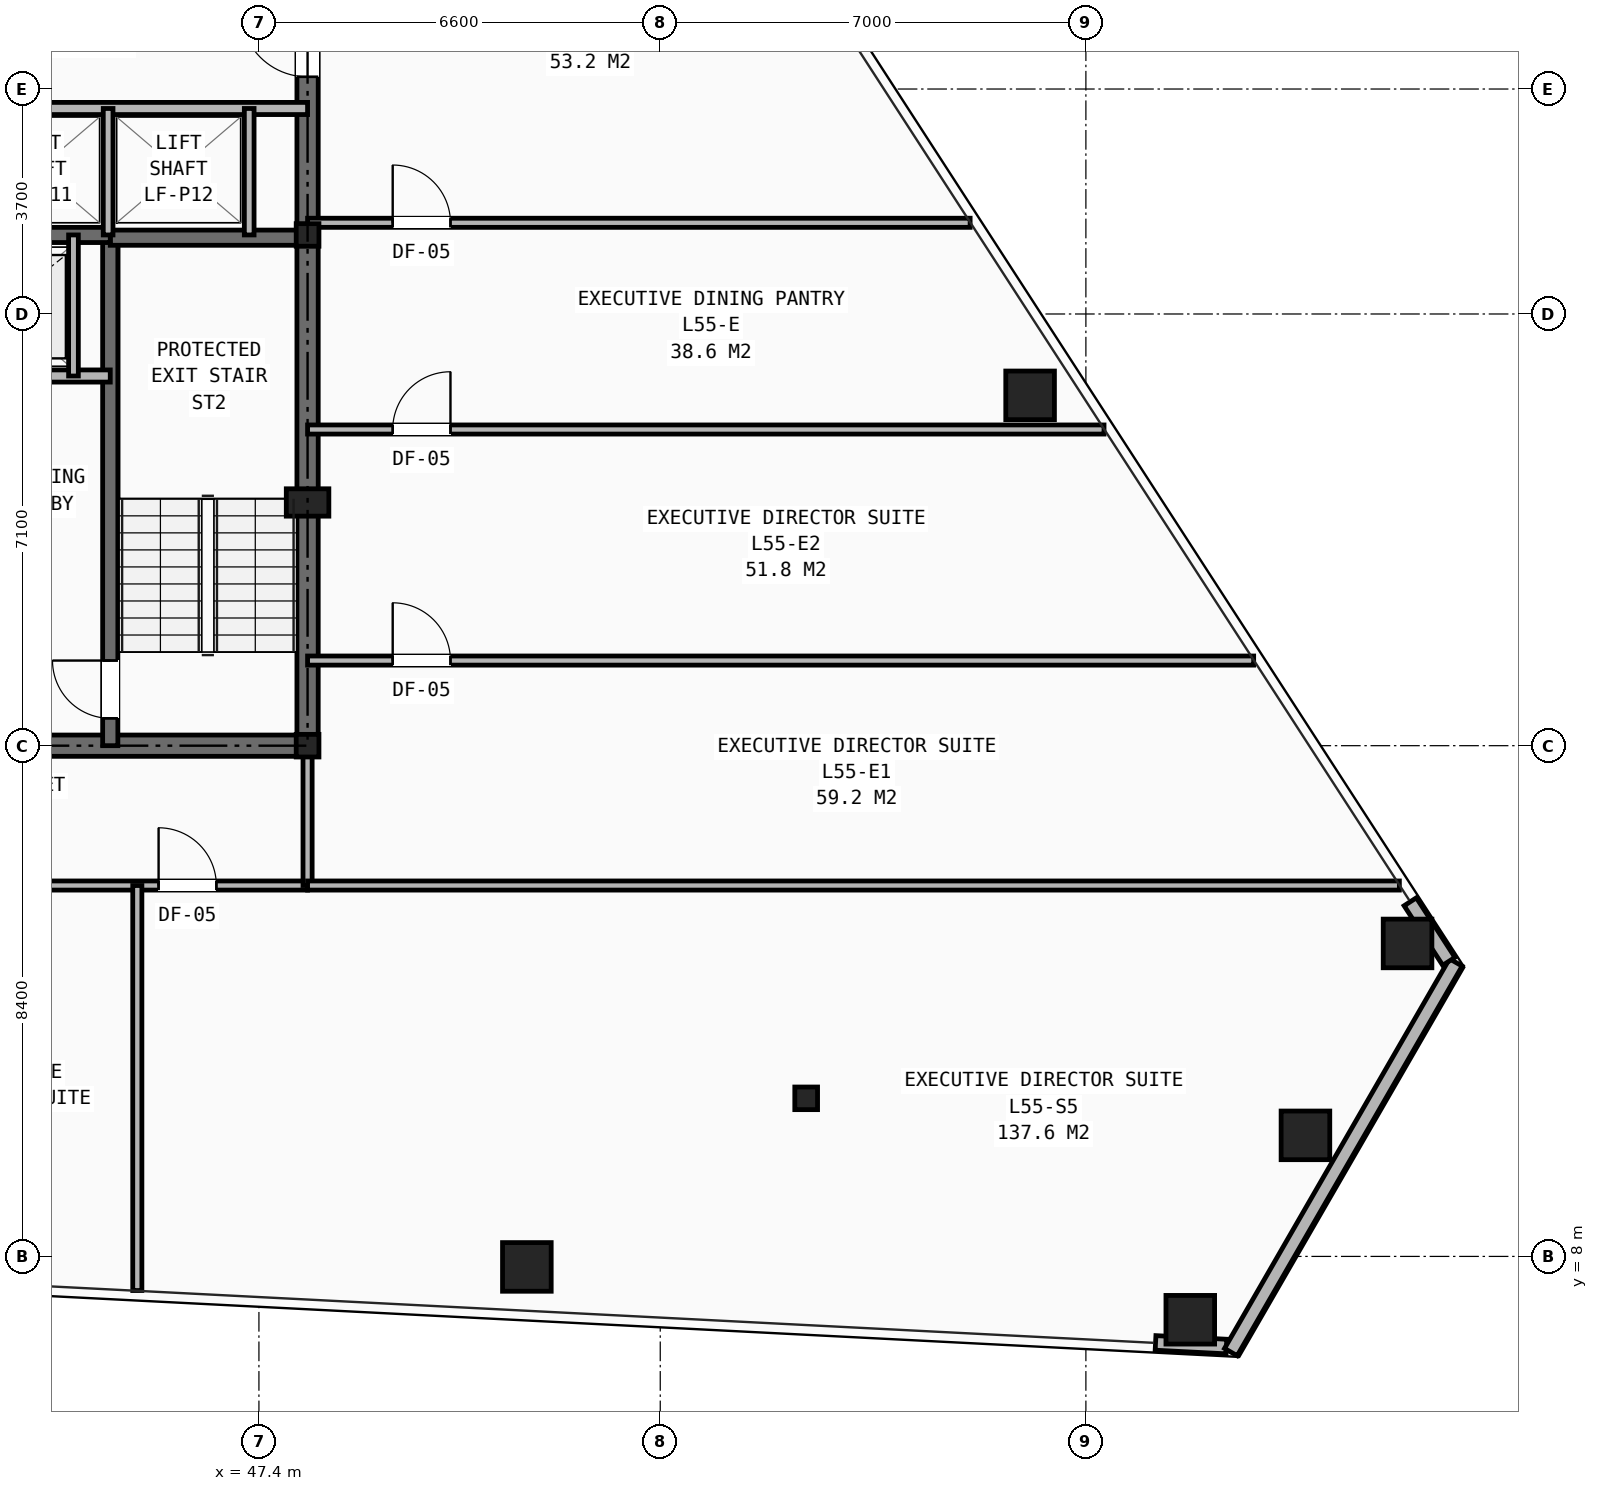
"""IFC4 building model, lengths in metres.
Left out: names, types, materials, properties, quantities, classifications, styles, units other than length and angle.
Written with IfcOpenShell. Run it as: python <this file> out.ifc"""

import sys

from ifc_helpers import new_model, si_unit, direction, frame, frame_2d, origin, origin_2d, place, context, subcontext, project, spatial, rectangle, hollow_rectangle, i_section, extrude, element, fill, save


model = new_model("IFC4")
c1 = context("Model", 3, precision=1e-05, world=origin(), true_north=direction((0.0, 1.0)))
c2 = subcontext(c1, "Body", "Model", "MODEL_VIEW")
j1 = project(units=[si_unit("LENGTHUNIT", "METRE"), si_unit("PLANEANGLEUNIT", "RADIAN")], contexts=[c1])
p1 = place(None, origin())
s1 = spatial("IfcSite", under=j1, at=p1, CompositionType="ELEMENT")
p2 = place(p1, origin())
s2 = spatial("IfcBuilding", under=s1, at=p2, CompositionType="ELEMENT")
p3 = place(p2, frame((0.0, 0.0, 193.05)))
s3 = spatial("IfcBuildingStorey", under=s2, at=p3, CompositionType="ELEMENT", Elevation=193.05)
for number, where, z_axis, x_axis in (
    (1, (48.2, 16.4, 0.0), (0.0, 0.0, 1.0), (1.0, 0.0, 0.0)),
    (2, (48.2, 24.8, 0.0), (0.0, 0.0, 1.0), (1.0, 0.0, 0.0)),
    (3, (56.4, 10.6, 0.0), (0.0, 0.0, 1.0), (1.0, 0.0, 0.0)),
):
    element("IfcColumn", number, at=place(p3, frame(where, z_axis=z_axis, x_axis=x_axis)), inside=s3, PredefinedType="COLUMN", context=c2, shape_type="SweptSolid", body=[
        extrude(i_section(OverallWidth=0.374, OverallDepth=0.372, WebThickness=0.016, FlangeThickness=0.026, at=origin_2d()), origin(), (0.0, 0.0, 1.0), 3.45),
    ])
p4 = place(p3, frame((48.2, 20.4, 0.0), z_axis=(0.0, 0.0, 1.0), x_axis=(1.0, 0.0, 0.0)))
e4 = element("IfcColumn", 4, at=p4, inside=s3, PredefinedType="PILASTER", context=c2, shape_type="SweptSolid", body=[
    extrude(rectangle(XDim=0.7, YDim=0.45, at=origin_2d()), origin(), (0.0, 0.0, 1.0), 3.45),
])
for number, where, z_axis, x_axis in (
    (5, (51.806, 7.827, 0.0), (0.0, 0.0, 1.0), (1.0, 0.0, 0.0)),
    (6, (62.717, 6.958, 0.0), (0.0, 0.0, 1.0), (1.0, 0.0, 0.0)),
    (7, (64.611, 9.991, 0.0), (0.0, 0.0, 1.0), (1.0, 0.0, 0.0)),
    (8, (66.29, 13.147, 0.0), (0.0, 0.0, 1.0), (1.0, 0.0, 0.0)),
    (9, (60.083, 22.162, 0.0), (0.0, 0.0, 1.0), (1.0, 0.0, 0.0)),
):
    element("IfcColumn", number, at=place(p3, frame(where, z_axis=z_axis, x_axis=x_axis)), inside=s3, PredefinedType="COLUMN", context=c2, shape_type="SweptSolid", body=[
        extrude(hollow_rectangle(XDim=0.8, YDim=0.8, WallThickness=0.055, at=origin_2d()), origin(), (0.0, 0.0, 1.0), 3.45),
    ])
p5 = place(p3, frame((62.146, 6.577, 0.0), z_axis=(0.0, 0.0, 1.0), x_axis=(0.998696973005, -0.051032892443, 0.0)))
e10 = element("IfcWall", 10, at=p5, inside=s3, PredefinedType="SHEAR", context=c2, shape_type="SweptSolid", body=[
    extrude(rectangle(XDim=1.167, YDim=0.24, at=frame_2d((0.583, 0.0))), origin(), (0.0, 0.0, 1.0), 2.403),
])
p6 = place(p3, frame((67.084, 12.835, 0.0), z_axis=(0.0, 0.0, 1.0), x_axis=(-0.499988999718, -0.866031754707, 0.0)))
e11 = element("IfcWall", 11, at=p6, inside=s3, PredefinedType="SHEAR", context=c2, shape_type="SweptSolid", body=[
    extrude(rectangle(XDim=7.4, YDim=0.24, at=frame_2d((3.7, 0.0))), origin(), (0.0, 0.0, 1.0), 2.403),
])
p7 = place(p3, frame((66.969, 12.853, 0.0), z_axis=(0.0, 0.0, 1.0), x_axis=(-0.543502707761, 0.839407413987, 0.0)))
e12 = element("IfcWall", 12, at=p7, inside=s3, PredefinedType="SHEAR", context=c2, shape_type="SweptSolid", body=[
    extrude(rectangle(XDim=1.167, YDim=0.24, at=frame_2d((0.584, 0.0))), origin(), (0.0, 0.0, 1.0), 2.403),
])
p8 = place(p3, frame((31.8, 16.4, 0.0), z_axis=(0.0, 0.0, 1.0), x_axis=(1.0, 0.0, 0.0)))
e13 = element("IfcWall", 13, at=p8, inside=s3, PredefinedType="SHEAR", context=c2, shape_type="SweptSolid", body=[
    extrude(rectangle(XDim=16.4, YDim=0.35, at=frame_2d((8.2, 0.0))), origin(), (0.0, 0.0, 1.0), 3.03),
])
p9 = place(p8, frame((7.75, 0.0, 0.0)))
e14 = element("IfcOpeningElement", 14, at=p9, cuts=e13, PredefinedType="OPENING", context=c2, shape_type="SweptSolid", body=[
    extrude(rectangle(XDim=0.9, YDim=2.1, at=frame_2d((0.45, 1.05))), frame((0.0, 0.185, 0.0), z_axis=(0.0, -1.0, 0.0), x_axis=(1.0, 0.0, 0.0)), (0.0, 0.0, 1.0), 0.37),
])
p10 = place(p8, frame((4.2, 0.0, 0.0)))
e15 = element("IfcOpeningElement", 15, at=p10, cuts=e13, PredefinedType="OPENING", context=c2, shape_type="SweptSolid", body=[
    extrude(rectangle(XDim=0.95, YDim=2.1, at=frame_2d((0.475, 1.05))), frame((0.0, 0.185, 0.0), z_axis=(0.0, -1.0, 0.0), x_axis=(1.0, 0.0, 0.0)), (0.0, 0.0, 1.0), 0.37),
])
p11 = place(p8, frame((10.6, 0.0, 0.0)))
e16 = element("IfcOpeningElement", 16, at=p11, cuts=e13, PredefinedType="OPENING", context=c2, shape_type="SweptSolid", body=[
    extrude(rectangle(XDim=0.95, YDim=2.1, at=frame_2d((0.475, 1.05))), frame((0.0, 0.185, 0.0), z_axis=(0.0, -1.0, 0.0), x_axis=(1.0, 0.0, 0.0)), (0.0, 0.0, 1.0), 0.37),
])
p12 = place(p3, frame((48.2, 16.4, 0.0), z_axis=(0.0, 0.0, 1.0), x_axis=(0.0, 1.0, 0.0)))
e17 = element("IfcWall", 17, at=p12, inside=s3, PredefinedType="SHEAR", context=c2, shape_type="SweptSolid", body=[
    extrude(rectangle(XDim=14.8, YDim=0.35, at=frame_2d((7.4, 0.0))), origin(), (0.0, 0.0, 1.0), 3.03),
])
p13 = place(p12, frame((11.0, 0.0, 0.0)))
e18 = element("IfcOpeningElement", 18, at=p13, cuts=e17, PredefinedType="OPENING", context=c2, shape_type="SweptSolid", body=[
    extrude(rectangle(XDim=1.1, YDim=2.15, at=frame_2d((0.55, 1.075))), frame((0.0, 0.185, 0.0), z_axis=(0.0, -1.0, 0.0), x_axis=(1.0, 0.0, 0.0)), (0.0, 0.0, 1.0), 0.37),
])
p14 = place(p3, frame((44.955, 16.4, 0.0), z_axis=(0.0, 0.0, 1.0), x_axis=(0.0, 1.0, 0.0)))
e19 = element("IfcWall", 19, at=p14, inside=s3, PredefinedType="SHEAR", context=c2, shape_type="SweptSolid", body=[
    extrude(rectangle(XDim=8.4, YDim=0.25, at=frame_2d((4.2, 0.0))), origin(), (0.0, 0.0, 1.0), 3.03),
])
p15 = place(p14, frame((0.45, 0.0, 0.0)))
e20 = element("IfcOpeningElement", 20, at=p15, cuts=e19, PredefinedType="OPENING", context=c2, shape_type="SweptSolid", body=[
    extrude(rectangle(XDim=0.95, YDim=2.1, at=frame_2d((0.475, 1.05))), frame((0.0, 0.135, 0.0), z_axis=(0.0, -1.0, 0.0), x_axis=(1.0, 0.0, 0.0)), (0.0, 0.0, 1.0), 0.27),
])
p16 = place(p3, frame((44.955, 24.755, 0.0), z_axis=(0.0, 0.0, 1.0), x_axis=(1.0, 0.0, 0.0)))
e21 = element("IfcWall", 21, at=p16, inside=s3, PredefinedType="SHEAR", context=c2, shape_type="SweptSolid", body=[
    extrude(rectangle(XDim=3.245, YDim=0.25, at=frame_2d((1.623, 0.0))), origin(), (0.0, 0.0, 1.0), 3.03),
])
p17 = place(p3, frame((35.045, 24.8, 0.0), z_axis=(0.0, 0.0, 1.0), x_axis=(1.0, 0.0, 0.0)))
e22 = element("IfcWall", 22, at=p17, inside=s3, PredefinedType="SHEAR", context=c2, shape_type="SweptSolid", body=[
    extrude(rectangle(XDim=9.91, YDim=0.25, at=frame_2d((4.955, 0.0))), origin(), (0.0, 0.0, 1.0), 3.03),
])
p18 = place(p3, frame((35.045, 22.48, 0.0), z_axis=(0.0, 0.0, 1.0), x_axis=(1.0, 0.0, 0.0)))
e23 = element("IfcWall", 23, at=p18, inside=s3, PredefinedType="SOLIDWALL", context=c2, shape_type="SweptSolid", body=[
    extrude(rectangle(XDim=9.91, YDim=0.2, at=frame_2d((4.955, 0.0))), origin(), (0.0, 0.0, 1.0), 3.03),
])
p19 = place(p18, frame((1.255, 0.0, 0.0)))
e24 = element("IfcOpeningElement", 24, at=p19, cuts=e23, PredefinedType="OPENING", context=c2, shape_type="SweptSolid", body=[
    extrude(rectangle(XDim=1.1, YDim=2.15, at=frame_2d((0.55, 1.075))), frame((0.0, 0.11, 0.0), z_axis=(0.0, -1.0, 0.0), x_axis=(1.0, 0.0, 0.0)), (0.0, 0.0, 1.0), 0.22),
])
p20 = place(p18, frame((7.555, 0.0, 0.0)))
e25 = element("IfcOpeningElement", 25, at=p20, cuts=e23, PredefinedType="OPENING", context=c2, shape_type="SweptSolid", body=[
    extrude(rectangle(XDim=1.1, YDim=2.15, at=frame_2d((0.55, 1.075))), frame((0.0, 0.11, 0.0), z_axis=(0.0, -1.0, 0.0), x_axis=(1.0, 0.0, 0.0)), (0.0, 0.0, 1.0), 0.22),
])
p21 = place(p18, frame((4.405, 0.0, 0.0)))
e26 = element("IfcOpeningElement", 26, at=p21, cuts=e23, PredefinedType="OPENING", context=c2, shape_type="SweptSolid", body=[
    extrude(rectangle(XDim=1.1, YDim=2.15, at=frame_2d((0.55, 1.075))), frame((0.0, 0.11, 0.0), z_axis=(0.0, -1.0, 0.0), x_axis=(1.0, 0.0, 0.0)), (0.0, 0.0, 1.0), 0.22),
])
p22 = place(p3, frame((44.35, 22.48, 0.0), z_axis=(0.0, 0.0, 1.0), x_axis=(0.0, 1.0, 0.0)))
e27 = element("IfcWall", 27, at=p22, inside=s3, PredefinedType="SOLIDWALL", context=c2, shape_type="SweptSolid", body=[
    extrude(rectangle(XDim=2.32, YDim=0.16, at=frame_2d((1.16, 0.0))), origin(), (0.0, 0.0, 1.0), 3.03),
])
p23 = place(p3, frame((31.8, 26.88, 0.0), z_axis=(0.0, 0.0, 1.0), x_axis=(1.0, 0.0, 0.0)))
e28 = element("IfcWall", 28, at=p23, inside=s3, PredefinedType="SOLIDWALL", context=c2, shape_type="SweptSolid", body=[
    extrude(rectangle(XDim=16.4, YDim=0.2, at=frame_2d((8.2, 0.0))), origin(), (0.0, 0.0, 1.0), 2.485),
])
p24 = place(p23, frame((0.55, 0.0, 0.0)))
e29 = element("IfcOpeningElement", 29, at=p24, cuts=e28, PredefinedType="OPENING", context=c2, shape_type="SweptSolid", body=[
    extrude(rectangle(XDim=0.85, YDim=2.05, at=frame_2d((0.425, 1.025))), frame((0.0, 0.11, 0.0), z_axis=(0.0, -1.0, 0.0), x_axis=(1.0, 0.0, 0.0)), (0.0, 0.0, 1.0), 0.22),
])
p25 = place(p23, frame((2.55, 0.0, 0.0)))
e30 = element("IfcOpeningElement", 30, at=p25, cuts=e28, PredefinedType="OPENING", context=c2, shape_type="SweptSolid", body=[
    extrude(rectangle(XDim=1.1, YDim=2.15, at=frame_2d((0.55, 1.075))), frame((0.0, 0.11, 0.0), z_axis=(0.0, -1.0, 0.0), x_axis=(1.0, 0.0, 0.0)), (0.0, 0.0, 1.0), 0.22),
])
p26 = place(p23, frame((4.71, 0.0, 0.0)))
e31 = element("IfcOpeningElement", 31, at=p26, cuts=e28, PredefinedType="OPENING", context=c2, shape_type="SweptSolid", body=[
    extrude(rectangle(XDim=1.1, YDim=2.15, at=frame_2d((0.55, 1.075))), frame((0.0, 0.11, 0.0), z_axis=(0.0, -1.0, 0.0), x_axis=(1.0, 0.0, 0.0)), (0.0, 0.0, 1.0), 0.22),
])
p27 = place(p23, frame((6.87, 0.0, 0.0)))
e32 = element("IfcOpeningElement", 32, at=p27, cuts=e28, PredefinedType="OPENING", context=c2, shape_type="SweptSolid", body=[
    extrude(rectangle(XDim=1.1, YDim=2.15, at=frame_2d((0.55, 1.075))), frame((0.0, 0.11, 0.0), z_axis=(0.0, -1.0, 0.0), x_axis=(1.0, 0.0, 0.0)), (0.0, 0.0, 1.0), 0.22),
])
p28 = place(p23, frame((9.03, 0.0, 0.0)))
e33 = element("IfcOpeningElement", 33, at=p28, cuts=e28, PredefinedType="OPENING", context=c2, shape_type="SweptSolid", body=[
    extrude(rectangle(XDim=1.1, YDim=2.15, at=frame_2d((0.55, 1.075))), frame((0.0, 0.11, 0.0), z_axis=(0.0, -1.0, 0.0), x_axis=(1.0, 0.0, 0.0)), (0.0, 0.0, 1.0), 0.22),
])
for number, where, z_axis, x_axis in (
    (34, (44.92, 24.8, 0.0), (0.0, 0.0, 1.0), (0.0, 1.0, 0.0)),
    (35, (47.24, 24.8, 0.0), (0.0, 0.0, 1.0), (0.0, 1.0, 0.0)),
):
    element("IfcWall", number, at=place(p3, frame(where, z_axis=z_axis, x_axis=x_axis)), inside=s3, PredefinedType="SOLIDWALL", context=c2, shape_type="SweptSolid", body=[
        extrude(rectangle(XDim=2.08, YDim=0.16, at=frame_2d((1.04, 0.0))), origin(), (0.0, 0.0, 1.0), 3.03),
    ])
p29 = place(p3, frame((29.6, 14.1, 0.0), z_axis=(0.0, 0.0, 1.0), x_axis=(1.0, 0.0, 0.0)))
e36 = element("IfcWall", 36, at=p29, inside=s3, PredefinedType="PARTITIONING", context=c2, shape_type="SweptSolid", body=[
    extrude(rectangle(XDim=18.6, YDim=0.15, at=frame_2d((9.3, 0.0))), origin(), (0.0, 0.0, 1.0), 2.161),
])
p30 = place(p29, frame((0.55, 0.0, 0.0)))
e37 = element("IfcOpeningElement", 37, at=p30, cuts=e36, PredefinedType="OPENING", context=c2, shape_type="SweptSolid", body=[
    extrude(rectangle(XDim=0.95, YDim=2.1, at=frame_2d((0.475, 1.05))), frame((0.0, 0.085, 0.0), z_axis=(0.0, -1.0, 0.0), x_axis=(1.0, 0.0, 0.0)), (0.0, 0.0, 1.0), 0.17),
])
p31 = place(p29, frame((3.55, 0.0, 0.0)))
e38 = element("IfcOpeningElement", 38, at=p31, cuts=e36, PredefinedType="OPENING", context=c2, shape_type="SweptSolid", body=[
    extrude(rectangle(XDim=0.95, YDim=2.1, at=frame_2d((0.475, 1.05))), frame((0.0, 0.085, 0.0), z_axis=(0.0, -1.0, 0.0), x_axis=(1.0, 0.0, 0.0)), (0.0, 0.0, 1.0), 0.17),
])
p32 = place(p29, frame((7.55, 0.0, 0.0)))
e39 = element("IfcOpeningElement", 39, at=p32, cuts=e36, PredefinedType="OPENING", context=c2, shape_type="SweptSolid", body=[
    extrude(rectangle(XDim=0.95, YDim=2.1, at=frame_2d((0.475, 1.05))), frame((0.0, 0.085, 0.0), z_axis=(0.0, -1.0, 0.0), x_axis=(1.0, 0.0, 0.0)), (0.0, 0.0, 1.0), 0.17),
])
p33 = place(p29, frame((11.95, 0.0, 0.0)))
e40 = element("IfcOpeningElement", 40, at=p33, cuts=e36, PredefinedType="OPENING", context=c2, shape_type="SweptSolid", body=[
    extrude(rectangle(XDim=0.95, YDim=2.1, at=frame_2d((0.475, 1.05))), frame((0.0, 0.085, 0.0), z_axis=(0.0, -1.0, 0.0), x_axis=(1.0, 0.0, 0.0)), (0.0, 0.0, 1.0), 0.17),
])
p34 = place(p29, frame((16.15, 0.0, 0.0)))
e41 = element("IfcOpeningElement", 41, at=p34, cuts=e36, PredefinedType="OPENING", context=c2, shape_type="SweptSolid", body=[
    extrude(rectangle(XDim=0.95, YDim=2.1, at=frame_2d((0.475, 1.05))), frame((0.0, 0.085, 0.0), z_axis=(0.0, -1.0, 0.0), x_axis=(1.0, 0.0, 0.0)), (0.0, 0.0, 1.0), 0.17),
])
p35 = place(p3, frame((48.2, 14.1, 0.0), z_axis=(0.0, 0.0, 1.0), x_axis=(0.0, 1.0, 0.0)))
e42 = element("IfcWall", 42, at=p35, inside=s3, PredefinedType="PARTITIONING", context=c2, shape_type="SweptSolid", body=[
    extrude(rectangle(XDim=2.3, YDim=0.15, at=frame_2d((1.15, 0.0))), origin(), (0.0, 0.0, 1.0), 2.485),
])
p36 = place(p3, frame((45.4, 7.439, 0.0), z_axis=(0.0, 0.0, 1.0), x_axis=(0.0, 1.0, 0.0)))
e43 = element("IfcWall", 43, at=p36, inside=s3, PredefinedType="PARTITIONING", context=c2, shape_type="SweptSolid", body=[
    extrude(rectangle(XDim=6.661, YDim=0.15, at=frame_2d((3.331, 0.0))), origin(), (0.0, 0.0, 1.0), 2.409),
])
p37 = place(p3, frame((48.2, 14.1, 0.0), z_axis=(0.0, 0.0, 1.0), x_axis=(1.0, 0.0, 0.0)))
e44 = element("IfcWall", 44, at=p37, inside=s3, PredefinedType="PARTITIONING", context=c2, shape_type="SweptSolid", body=[
    extrude(rectangle(XDim=17.956, YDim=0.15, at=frame_2d((8.978, 0.0))), origin(), (0.0, 0.0, 1.0), 2.161),
])
p38 = place(p3, frame((48.2, 17.8, 0.0), z_axis=(0.0, 0.0, 1.0), x_axis=(1.0, 0.0, 0.0)))
e45 = element("IfcWall", 45, at=p38, inside=s3, PredefinedType="PARTITIONING", context=c2, shape_type="SweptSolid", body=[
    extrude(rectangle(XDim=15.559, YDim=0.15, at=frame_2d((7.78, 0.0))), origin(), (0.0, 0.0, 1.0), 2.161),
])
p39 = place(p38, frame((1.4, 0.0, 0.0)))
e46 = element("IfcOpeningElement", 46, at=p39, cuts=e45, PredefinedType="OPENING", context=c2, shape_type="SweptSolid", body=[
    extrude(rectangle(XDim=0.95, YDim=2.1, at=frame_2d((0.475, 1.05))), frame((0.0, 0.085, 0.0), z_axis=(0.0, -1.0, 0.0), x_axis=(1.0, 0.0, 0.0)), (0.0, 0.0, 1.0), 0.17),
])
p40 = place(p3, frame((48.2, 21.6, 0.0), z_axis=(0.0, 0.0, 1.0), x_axis=(1.0, 0.0, 0.0)))
e47 = element("IfcWall", 47, at=p40, inside=s3, PredefinedType="PARTITIONING", context=c2, shape_type="SweptSolid", body=[
    extrude(rectangle(XDim=13.098, YDim=0.15, at=frame_2d((6.549, 0.0))), origin(), (0.0, 0.0, 1.0), 2.161),
])
p41 = place(p40, frame((1.4, 0.0, 0.0)))
e48 = element("IfcOpeningElement", 48, at=p41, cuts=e47, PredefinedType="OPENING", context=c2, shape_type="SweptSolid", body=[
    extrude(rectangle(XDim=0.95, YDim=2.1, at=frame_2d((0.475, 1.05))), frame((0.0, 0.085, 0.0), z_axis=(0.0, -1.0, 0.0), x_axis=(1.0, 0.0, 0.0)), (0.0, 0.0, 1.0), 0.17),
])
p42 = place(p3, frame((48.2, 25.0, 0.0), z_axis=(0.0, 0.0, 1.0), x_axis=(1.0, 0.0, 0.0)))
e49 = element("IfcWall", 49, at=p42, inside=s3, PredefinedType="PARTITIONING", context=c2, shape_type="SweptSolid", body=[
    extrude(rectangle(XDim=10.896, YDim=0.15, at=frame_2d((5.448, 0.0))), origin(), (0.0, 0.0, 1.0), 2.161),
])
p43 = place(p42, frame((1.4, 0.0, 0.0)))
e50 = element("IfcOpeningElement", 50, at=p43, cuts=e49, PredefinedType="OPENING", context=c2, shape_type="SweptSolid", body=[
    extrude(rectangle(XDim=0.95, YDim=2.1, at=frame_2d((0.475, 1.05))), frame((0.0, 0.085, 0.0), z_axis=(0.0, -1.0, 0.0), x_axis=(1.0, 0.0, 0.0)), (0.0, 0.0, 1.0), 0.17),
])
p44 = place(p15, origin())
e51 = element("IfcDoor", 51, at=p44, inside=s3, OperationType="SINGLE_SWING_RIGHT", PredefinedType="DOOR", context=c2, shape_type="SweptSolid", body=[
    extrude(rectangle(XDim=0.95, YDim=2.1, at=frame_2d((0.475, 1.05))), frame((0.0, 0.025, 0.0), z_axis=(0.0, -1.0, 0.0), x_axis=(1.0, 0.0, 0.0)), (0.0, 0.0, 1.0), 0.05),
])
fill(e20, e51)
p45 = place(p13, origin())
e52 = element("IfcDoor", 52, at=p45, inside=s3, OperationType="SINGLE_SWING_RIGHT", PredefinedType="DOOR", context=c2, shape_type="SweptSolid", body=[
    extrude(rectangle(XDim=1.1, YDim=2.15, at=frame_2d((0.55, 1.075))), frame((0.0, 0.025, 0.0), z_axis=(0.0, -1.0, 0.0), x_axis=(1.0, 0.0, 0.0)), (0.0, 0.0, 1.0), 0.05),
])
fill(e18, e52)
p46 = place(p34, origin())
e53 = element("IfcDoor", 53, at=p46, inside=s3, OperationType="SINGLE_SWING_LEFT", PredefinedType="DOOR", context=c2, shape_type="SweptSolid", body=[
    extrude(rectangle(XDim=0.95, YDim=2.1, at=frame_2d((0.475, 1.05))), frame((0.0, 0.025, 0.0), z_axis=(0.0, -1.0, 0.0), x_axis=(1.0, 0.0, 0.0)), (0.0, 0.0, 1.0), 0.05),
])
fill(e41, e53)
p47 = place(p39, origin())
e54 = element("IfcDoor", 54, at=p47, inside=s3, OperationType="SINGLE_SWING_LEFT", PredefinedType="DOOR", context=c2, shape_type="SweptSolid", body=[
    extrude(rectangle(XDim=0.95, YDim=2.1, at=frame_2d((0.475, 1.05))), frame((0.0, 0.025, 0.0), z_axis=(0.0, -1.0, 0.0), x_axis=(1.0, 0.0, 0.0)), (0.0, 0.0, 1.0), 0.05),
])
fill(e46, e54)
p48 = place(p41, origin())
e55 = element("IfcDoor", 55, at=p48, inside=s3, OperationType="SINGLE_SWING_RIGHT", PredefinedType="DOOR", context=c2, shape_type="SweptSolid", body=[
    extrude(rectangle(XDim=0.95, YDim=2.1, at=frame_2d((0.475, 1.05))), frame((0.0, 0.025, 0.0), z_axis=(0.0, -1.0, 0.0), x_axis=(1.0, 0.0, 0.0)), (0.0, 0.0, 1.0), 0.05),
])
fill(e48, e55)
p49 = place(p43, origin())
e56 = element("IfcDoor", 56, at=p49, inside=s3, OperationType="SINGLE_SWING_LEFT", PredefinedType="DOOR", context=c2, shape_type="SweptSolid", body=[
    extrude(rectangle(XDim=0.95, YDim=2.1, at=frame_2d((0.475, 1.05))), frame((0.0, 0.025, 0.0), z_axis=(0.0, -1.0, 0.0), x_axis=(1.0, 0.0, 0.0)), (0.0, 0.0, 1.0), 0.05),
])
fill(e50, e56)
save(model, sys.argv[1])
